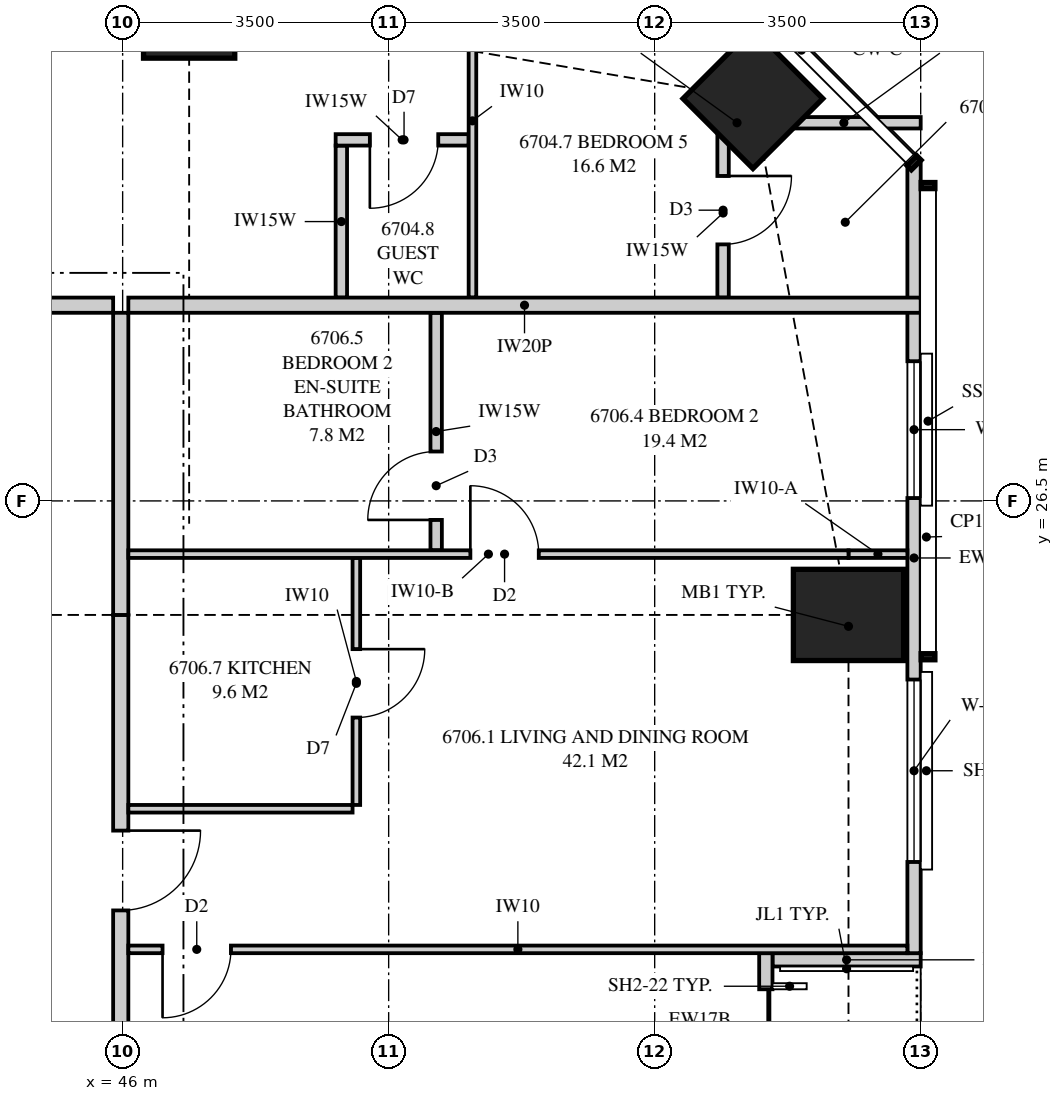
"""IFC4 building model, lengths in metres.
Left out: names, types, materials, properties, quantities, classifications, styles, units other than length and angle.
Written with IfcOpenShell. Run it as: python <this file> out.ifc"""

import sys

from ifc_helpers import new_model, si_unit, direction, frame, frame_2d, origin, origin_2d, place, context, subcontext, project, spatial, polyline, rectangle, outline, extrude, element, fill, save


model = new_model("IFC4")
c1 = context("Model", 3, precision=1e-05, world=origin(), true_north=direction((0.0, 1.0)))
c2 = subcontext(c1, "Body", "Model", "MODEL_VIEW")
j1 = project(units=[si_unit("LENGTHUNIT", "METRE"), si_unit("PLANEANGLEUNIT", "RADIAN")], contexts=[c1])
p1 = place(None, origin())
s1 = spatial("IfcSite", under=j1, at=p1, CompositionType="ELEMENT")
p2 = place(p1, origin())
s2 = spatial("IfcBuilding", under=s1, at=p2, CompositionType="ELEMENT")
p3 = place(p2, frame((0.0, 0.0, 245.95)))
s3 = spatial("IfcBuildingStorey", under=s2, at=p3, CompositionType="ELEMENT", Elevation=245.95)
p4 = place(p3, frame((55.55, 25.0, 0.0), z_axis=(0.0, 0.0, 1.0), x_axis=(1.0, 0.0, 0.0)))
e1 = element("IfcColumn", 1, at=p4, inside=s3, PredefinedType="COLUMN", context=c2, shape_type="SweptSolid", body=[
    extrude(rectangle(XDim=1.45, YDim=1.2, at=origin_2d()), origin(), (0.0, 0.0, 1.0), 3.5),
])
p5 = place(p3, frame((54.293, 31.793, 0.0), z_axis=(0.0, 0.0, 1.0), x_axis=(0.707106781187, 0.707106781187, 0.0)))
e2 = element("IfcColumn", 2, at=p5, inside=s3, PredefinedType="COLUMN", context=c2, shape_type="SweptSolid", body=[
    extrude(rectangle(XDim=1.3, YDim=1.3, at=origin_2d()), origin(), (0.0, 0.0, 1.0), 3.5),
])
p6 = place(p3, frame((46.875, 33.05, 0.0), z_axis=(0.0, 0.0, 1.0), x_axis=(0.0, 1.0, 0.0)))
e3 = element("IfcColumn", 3, at=p6, inside=s3, PredefinedType="COLUMN", context=c2, shape_type="SweptSolid", body=[
    extrude(rectangle(XDim=1.45, YDim=1.2, at=origin_2d()), origin(), (0.0, 0.0, 1.0), 3.5),
])
p7 = place(p3, frame((56.413, 20.55, 0.0), z_axis=(0.0, 0.0, 1.0), x_axis=(0.0, 1.0, 0.0)))
e4 = element("IfcWall", 4, at=p7, inside=s3, PredefinedType="SOLIDWALL", context=c2, shape_type="SweptSolid", body=[
    extrude(outline(polyline([(0.0, 0.0), (10.399, 0.0), (10.399, 3.26), (4.658, 3.26), (4.658, 2.3), (4.594, 2.3), (4.594, 3.26), (4.45, 3.26), (4.45, 2.3), (0.0, 2.3), (0.0, 0.0)])), frame((0.0, 0.087, 0.0), z_axis=(0.0, -1.0, 0.0), x_axis=(1.0, 0.0, 0.0)), (0.0, 0.0, 1.0), 0.175),
])
p8 = place(p7, frame((1.2, 0.0, 0.4)))
e5 = element("IfcOpeningElement", 5, at=p8, cuts=e4, PredefinedType="OPENING", context=c2, shape_type="SweptSolid", body=[
    extrude(rectangle(XDim=2.4, YDim=1.85, at=frame_2d((1.2, 0.925))), frame((0.0, 0.097, 0.0), z_axis=(0.0, -1.0, 0.0), x_axis=(1.0, 0.0, 0.0)), (0.0, 0.0, 1.0), 0.195),
])
p9 = place(p7, frame((5.988, 0.0, 0.4)))
e6 = element("IfcOpeningElement", 6, at=p9, cuts=e4, PredefinedType="OPENING", context=c2, shape_type="SweptSolid", body=[
    extrude(rectangle(XDim=1.8, YDim=1.85, at=frame_2d((0.9, 0.925))), frame((0.0, 0.097, 0.0), z_axis=(0.0, -1.0, 0.0), x_axis=(1.0, 0.0, 0.0)), (0.0, 0.0, 1.0), 0.195),
])
p10 = place(p3, frame((54.462, 17.8, 0.0), z_axis=(0.0, 0.0, 1.0), x_axis=(0.0, 1.0, 0.0)))
e7 = element("IfcWall", 7, at=p10, inside=s3, PredefinedType="SOLIDWALL", context=c2, shape_type="SweptSolid", body=[
    extrude(outline(polyline([(0.0, 0.0), (2.75, 0.0), (2.75, 3.26), (2.15, 3.26), (2.15, 2.66), (0.0, 2.66), (0.0, 0.0)])), frame((0.0, 0.087, 0.0), z_axis=(0.0, -1.0, 0.0), x_axis=(1.0, 0.0, 0.0)), (0.0, 0.0, 1.0), 0.175),
])
p11 = place(p10, frame((0.475, 0.0, 0.0)))
e8 = element("IfcOpeningElement", 8, at=p11, cuts=e7, PredefinedType="OPENING", context=c2, shape_type="SweptSolid", body=[
    extrude(rectangle(XDim=1.8, YDim=2.25, at=frame_2d((0.9, 1.125))), frame((0.0, 0.097, 0.0), z_axis=(0.0, -1.0, 0.0), x_axis=(1.0, 0.0, 0.0)), (0.0, 0.0, 1.0), 0.195),
])
p12 = place(p3, frame((56.5, 20.462, 0.0), z_axis=(0.0, 0.0, 1.0), x_axis=(-1.0, 0.0, 0.0)))
e9 = element("IfcWall", 9, at=p12, inside=s3, PredefinedType="SOLIDWALL", context=c2, shape_type="SweptSolid", body=[
    extrude(outline(polyline([(0.0, 0.0), (1.95, 0.0), (1.95, 3.26), (1.75, 3.26), (1.75, 2.3), (0.15, 2.3), (0.15, 3.26), (0.0, 3.26), (0.0, 0.0)])), frame((0.0, 0.087, 0.0), z_axis=(0.0, -1.0, 0.0), x_axis=(1.0, 0.0, 0.0)), (0.0, 0.0, 1.0), 0.175),
])
p13 = place(p3, frame((18.0, 29.075, 0.0), z_axis=(0.0, 0.0, 1.0), x_axis=(1.0, 0.0, 0.0)))
e10 = element("IfcWall", 10, at=p13, inside=s3, PredefinedType="PARTITIONING", context=c2, shape_type="SweptSolid", body=[
    extrude(outline(polyline([(0.0, 0.0), (27.875, 0.0), (27.875, 3.26), (27.875, 2.66), (27.565, 2.66), (27.565, 3.26), (20.56, 3.26), (20.56, 2.66), (17.94, 2.66), (17.94, 3.26), (10.935, 3.26), (10.935, 2.66), (8.315, 2.66), (8.315, 3.26), (2.192, 3.26), (2.192, 2.3), (0.256, 2.3), (0.256, 3.26), (0.0, 3.26), (0.0, 0.0)])), frame((0.0, 0.1, 0.0), z_axis=(0.0, -1.0, 0.0), x_axis=(1.0, 0.0, 0.0)), (0.0, 0.0, 1.0), 0.2),
])
p14 = place(p13, frame((18.75, 0.0, 0.0)))
e11 = element("IfcOpeningElement", 11, at=p14, cuts=e10, PredefinedType="OPENING", context=c2, shape_type="SweptSolid", body=[
    extrude(rectangle(XDim=1.05, YDim=2.2, at=frame_2d((0.525, 1.1))), frame((0.0, 0.11, 0.0), z_axis=(0.0, -1.0, 0.0), x_axis=(1.0, 0.0, 0.0)), (0.0, 0.0, 1.0), 0.22),
])
p15 = place(p3, frame((53.975, 31.475, 0.0), z_axis=(0.0, 0.0, 1.0), x_axis=(1.0, 0.0, 0.0)))
e12 = element("IfcWall", 12, at=p15, inside=s3, PredefinedType="PLUMBINGWALL", context=c2, shape_type="SweptSolid", body=[
    extrude(rectangle(XDim=0.217, YDim=0.15, at=frame_2d((0.108, 0.0))), origin(), (0.0, 0.0, 1.0), 2.3),
])
p16 = place(p3, frame((54.478, 31.475, 0.0), z_axis=(0.0, 0.0, 1.0), x_axis=(1.0, 0.0, 0.0)))
e13 = element("IfcWall", 13, at=p16, inside=s3, PredefinedType="PLUMBINGWALL", context=c2, shape_type="SweptSolid", body=[
    extrude(outline(polyline([(0.774, 3.26), (0.774, 2.3), (0.325, 2.3), (0.0, 1.15), (0.325, 0.0), (2.022, 0.0), (2.022, 3.26), (0.774, 3.26)])), frame((0.0, 0.075, 0.0), z_axis=(0.0, -1.0, 0.0), x_axis=(1.0, 0.0, 0.0)), (0.0, 0.0, 1.0), 0.15),
])
p17 = place(p3, frame((53.9, 31.4, 0.0), z_axis=(0.0, 0.0, 1.0), x_axis=(0.0, -1.0, 0.0)))
e14 = element("IfcWall", 14, at=p17, inside=s3, PredefinedType="PLUMBINGWALL", context=c2, shape_type="SweptSolid", body=[
    extrude(outline(polyline([(0.0, 0.0), (2.225, 0.0), (2.225, 3.26), (2.225, 2.3), (0.438, 2.3), (0.0, 2.3), (0.0, 3.26), (0.0, 0.0)])), frame((0.0, 0.075, 0.0), z_axis=(0.0, -1.0, 0.0), x_axis=(1.0, 0.0, 0.0)), (0.0, 0.0, 1.0), 0.15),
])
p18 = place(p17, frame((0.625, 0.0, 0.0)))
e15 = element("IfcOpeningElement", 15, at=p18, cuts=e14, PredefinedType="OPENING", context=c2, shape_type="SweptSolid", body=[
    extrude(rectangle(XDim=0.9, YDim=2.1, at=frame_2d((0.45, 1.05))), frame((0.0, 0.085, 0.0), z_axis=(0.0, -1.0, 0.0), x_axis=(1.0, 0.0, 0.0)), (0.0, 0.0, 1.0), 0.17),
])
p19 = place(p3, frame((50.603, 33.825, 0.0), z_axis=(0.0, 0.0, 1.0), x_axis=(0.0, -1.0, 0.0)))
e16 = element("IfcWall", 16, at=p19, inside=s3, PredefinedType="PARTITIONING", context=c2, shape_type="SweptSolid", body=[
    extrude(outline(polyline([(0.0, 0.0), (4.65, 0.0), (4.65, 3.26), (2.279, 3.26), (2.279, 2.3), (0.534, 2.3), (0.534, 3.26), (0.0, 3.26), (0.0, 0.0)])), frame((0.0, 0.05, 0.0), z_axis=(0.0, -1.0, 0.0), x_axis=(1.0, 0.0, 0.0)), (0.0, 0.0, 1.0), 0.1),
])
p20 = place(p19, frame((0.15, 0.0, 0.0)))
e17 = element("IfcOpeningElement", 17, at=p20, cuts=e16, PredefinedType="OPENING", context=c2, shape_type="SweptSolid", body=[
    extrude(rectangle(XDim=0.9, YDim=2.1, at=frame_2d((0.45, 1.05))), frame((0.0, 0.06, 0.0), z_axis=(0.0, -1.0, 0.0), x_axis=(1.0, 0.0, 0.0)), (0.0, 0.0, 1.0), 0.12),
])
p21 = place(p3, frame((46.075, 29.075, 0.0), z_axis=(0.0, 0.0, 1.0), x_axis=(1.0, 0.0, 0.0)))
e18 = element("IfcWall", 18, at=p21, inside=s3, PredefinedType="PARTITIONING", context=c2, shape_type="SweptSolid", body=[
    extrude(outline(polyline([(0.0, 0.0), (10.425, 0.0), (10.425, 3.26), (9.646, 3.26), (9.646, 2.3), (7.795, 2.3), (7.795, 3.26), (2.11, 3.26), (2.11, 2.66), (0.0, 2.66), (0.0, 3.26), (0.0, 0.0)])), frame((0.0, 0.1, 0.0), z_axis=(0.0, -1.0, 0.0), x_axis=(1.0, 0.0, 0.0)), (0.0, 0.0, 1.0), 0.2),
])
p22 = place(p3, frame((45.975, 14.25, 0.0), z_axis=(0.0, 0.0, 1.0), x_axis=(0.0, 1.0, 0.0)))
e19 = element("IfcWall", 19, at=p22, inside=s3, PredefinedType="PARTITIONING", context=c2, shape_type="SweptSolid", body=[
    extrude(outline(polyline([(0.0, 0.0), (10.75, 0.0), (10.75, 2.66), (9.44, 2.66), (9.44, 3.26), (5.81, 3.26), (5.81, 2.66), (3.19, 2.66), (3.19, 3.26), (0.06, 3.26), (0.06, 2.66), (0.0, 2.66), (0.0, 0.0)])), frame((0.0, 0.1, 0.0), z_axis=(0.0, -1.0, 0.0), x_axis=(1.0, 0.0, 0.0)), (0.0, 0.0, 1.0), 0.2),
])
p23 = place(p22, frame((6.863, 0.0, 0.0)))
e20 = element("IfcOpeningElement", 20, at=p23, cuts=e19, PredefinedType="OPENING", context=c2, shape_type="SweptSolid", body=[
    extrude(rectangle(XDim=1.05, YDim=2.2, at=frame_2d((0.525, 1.1))), frame((0.0, 0.11, 0.0), z_axis=(0.0, -1.0, 0.0), x_axis=(1.0, 0.0, 0.0)), (0.0, 0.0, 1.0), 0.22),
])
p24 = place(p3, frame((45.975, 25.0, 0.0), z_axis=(0.0, 0.0, 1.0), x_axis=(0.0, 1.0, 0.0)))
e21 = element("IfcWall", 21, at=p24, inside=s3, PredefinedType="PARTITIONING", context=c2, shape_type="SweptSolid", body=[
    extrude(rectangle(XDim=3.975, YDim=0.2, at=frame_2d((1.988, 0.0))), origin(), (0.0, 0.0, 1.0), 2.66),
])
p25 = place(p3, frame((56.325, 25.8, 0.0), z_axis=(0.0, 0.0, 1.0), x_axis=(-1.0, 0.0, 0.0)))
e22 = element("IfcWall", 22, at=p25, inside=s3, PredefinedType="PARTITIONING", context=c2, shape_type="SweptSolid", body=[
    extrude(outline(polyline([(0.0, 0.0), (0.775, 0.0), (0.775, 2.3), (0.048, 2.3), (0.048, 3.26), (0.0, 3.26), (0.0, 0.0)])), frame((0.0, 0.05, 0.0), z_axis=(0.0, -1.0, 0.0), x_axis=(1.0, 0.0, 0.0)), (0.0, 0.0, 1.0), 0.1),
])
p26 = place(p3, frame((55.55, 25.8, 0.0), z_axis=(0.0, 0.0, 1.0), x_axis=(-1.0, 0.0, 0.0)))
e23 = element("IfcWall", 23, at=p26, inside=s3, PredefinedType="PARTITIONING", context=c2, shape_type="SweptSolid", body=[
    extrude(outline(polyline([(0.0, 0.0), (9.475, 0.0), (9.475, 2.66), (1.023, 2.66), (1.023, 2.3), (0.0, 2.3), (0.0, 0.0)])), frame((0.0, 0.05, 0.0), z_axis=(0.0, -1.0, 0.0), x_axis=(1.0, 0.0, 0.0)), (0.0, 0.0, 1.0), 0.1),
])
p27 = place(p26, frame((4.075, 0.0, 0.0)))
e24 = element("IfcOpeningElement", 24, at=p27, cuts=e23, PredefinedType="OPENING", context=c2, shape_type="SweptSolid", body=[
    extrude(rectangle(XDim=0.9, YDim=2.1, at=frame_2d((0.45, 1.05))), frame((0.0, 0.06, 0.0), z_axis=(0.0, -1.0, 0.0), x_axis=(1.0, 0.0, 0.0)), (0.0, 0.0, 1.0), 0.12),
])
p28 = place(p3, frame((50.125, 25.85, 0.0), z_axis=(0.0, 0.0, 1.0), x_axis=(0.0, 1.0, 0.0)))
e25 = element("IfcWall", 25, at=p28, inside=s3, PredefinedType="PLUMBINGWALL", context=c2, shape_type="SweptSolid", body=[
    extrude(outline(polyline([(0.0, 0.0), (3.125, 0.0), (3.125, 3.26), (0.435, 3.26), (0.435, 2.66), (0.0, 2.66), (0.0, 3.26), (0.0, 0.0)])), frame((0.0, 0.075, 0.0), z_axis=(0.0, -1.0, 0.0), x_axis=(1.0, 0.0, 0.0)), (0.0, 0.0, 1.0), 0.15),
])
p29 = place(p28, frame((0.4, 0.0, 0.0)))
e26 = element("IfcOpeningElement", 26, at=p29, cuts=e25, PredefinedType="OPENING", context=c2, shape_type="SweptSolid", body=[
    extrude(rectangle(XDim=0.9, YDim=2.1, at=frame_2d((0.45, 1.05))), frame((0.0, 0.085, 0.0), z_axis=(0.0, -1.0, 0.0), x_axis=(1.0, 0.0, 0.0)), (0.0, 0.0, 1.0), 0.17),
])
p30 = place(p3, frame((56.325, 20.6, 0.0), z_axis=(0.0, 0.0, 1.0), x_axis=(-1.0, 0.0, 0.0)))
e27 = element("IfcWall", 27, at=p30, inside=s3, PredefinedType="PARTITIONING", context=c2, shape_type="SweptSolid", body=[
    extrude(outline(polyline([(0.0, 0.0), (10.25, 0.0), (10.25, 3.26), (1.635, 3.26), (1.635, 2.3), (0.0, 2.3), (0.0, 3.26), (0.0, 0.0)])), frame((0.0, 0.05, 0.0), z_axis=(0.0, -1.0, 0.0), x_axis=(1.0, 0.0, 0.0)), (0.0, 0.0, 1.0), 0.1),
])
p31 = place(p30, frame((8.9, 0.0, 0.0)))
e28 = element("IfcOpeningElement", 28, at=p31, cuts=e27, PredefinedType="OPENING", context=c2, shape_type="SweptSolid", body=[
    extrude(rectangle(XDim=0.9, YDim=2.1, at=frame_2d((0.45, 1.05))), frame((0.0, 0.06, 0.0), z_axis=(0.0, -1.0, 0.0), x_axis=(1.0, 0.0, 0.0)), (0.0, 0.0, 1.0), 0.12),
])
p32 = place(p3, frame((49.075, 22.5, 0.0), z_axis=(0.0, 0.0, 1.0), x_axis=(0.0, 1.0, 0.0)))
e29 = element("IfcWall", 29, at=p32, inside=s3, PredefinedType="PARTITIONING", context=c2, shape_type="SweptSolid", body=[
    extrude(outline(polyline([(0.0, 0.0), (3.25, 0.0), (3.25, 3.26), (3.25, 2.66), (1.24, 2.66), (1.24, 3.26), (0.0, 3.26), (0.0, 0.0)])), frame((0.0, 0.05, 0.0), z_axis=(0.0, -1.0, 0.0), x_axis=(1.0, 0.0, 0.0)), (0.0, 0.0, 1.0), 0.1),
])
p33 = place(p32, frame((1.15, 0.0, 0.0)))
e30 = element("IfcOpeningElement", 30, at=p33, cuts=e29, PredefinedType="OPENING", context=c2, shape_type="SweptSolid", body=[
    extrude(rectangle(XDim=0.9, YDim=2.1, at=frame_2d((0.45, 1.05))), frame((0.0, 0.06, 0.0), z_axis=(0.0, -1.0, 0.0), x_axis=(1.0, 0.0, 0.0)), (0.0, 0.0, 1.0), 0.12),
])
p34 = place(p3, frame((49.025, 22.45, 0.0), z_axis=(0.0, 0.0, 1.0), x_axis=(-1.0, 0.0, 0.0)))
e31 = element("IfcWall", 31, at=p34, inside=s3, PredefinedType="PARTITIONING", context=c2, shape_type="SweptSolid", body=[
    extrude(rectangle(XDim=2.95, YDim=0.1, at=frame_2d((1.475, 0.0))), origin(), (0.0, 0.0, 1.0), 3.26),
])
p35 = place(p3, frame((50.552, 31.25, 0.0), z_axis=(0.0, 0.0, 1.0), x_axis=(-1.0, 0.0, 0.0)))
e32 = element("IfcWall", 32, at=p35, inside=s3, PredefinedType="PLUMBINGWALL", context=c2, shape_type="SweptSolid", body=[
    extrude(rectangle(XDim=1.75, YDim=0.15, at=frame_2d((0.875, 0.0))), origin(), (0.0, 0.0, 1.0), 3.26),
])
p36 = place(p35, frame((0.4, 0.0, 0.0)))
e33 = element("IfcOpeningElement", 33, at=p36, cuts=e32, PredefinedType="OPENING", context=c2, shape_type="SweptSolid", body=[
    extrude(rectangle(XDim=0.9, YDim=2.1, at=frame_2d((0.45, 1.05))), frame((0.0, 0.085, 0.0), z_axis=(0.0, -1.0, 0.0), x_axis=(1.0, 0.0, 0.0)), (0.0, 0.0, 1.0), 0.17),
])
p37 = place(p3, frame((48.877, 29.175, 0.0), z_axis=(0.0, 0.0, 1.0), x_axis=(0.0, 1.0, 0.0)))
e34 = element("IfcWall", 34, at=p37, inside=s3, PredefinedType="PLUMBINGWALL", context=c2, shape_type="SweptSolid", body=[
    extrude(rectangle(XDim=2.0, YDim=0.15, at=frame_2d((1.0, 0.0))), origin(), (0.0, 0.0, 1.0), 3.26),
])
p38 = place(p11, origin())
e35 = element("IfcDoor", 35, at=p38, inside=s3, OperationType="SLIDING_TO_LEFT", PredefinedType="DOOR", context=c2, shape_type="SweptSolid", body=[
    extrude(rectangle(XDim=1.8, YDim=2.25, at=frame_2d((0.9, 1.125))), frame((0.0, 0.025, 0.0), z_axis=(0.0, -1.0, 0.0), x_axis=(1.0, 0.0, 0.0)), (0.0, 0.0, 1.0), 0.05),
])
fill(e8, e35)
p39 = place(p8, origin())
e36 = element("IfcWindow", 36, at=p39, inside=s3, PartitioningType="SINGLE_PANEL", PredefinedType="WINDOW", context=c2, shape_type="SweptSolid", body=[
    extrude(rectangle(XDim=2.4, YDim=1.85, at=frame_2d((1.2, 0.925))), frame((0.0, 0.03, 0.0), z_axis=(0.0, -1.0, 0.0), x_axis=(1.0, 0.0, 0.0)), (0.0, 0.0, 1.0), 0.06),
])
fill(e5, e36)
p40 = place(p9, origin())
e37 = element("IfcWindow", 37, at=p40, inside=s3, PartitioningType="SINGLE_PANEL", PredefinedType="WINDOW", context=c2, shape_type="SweptSolid", body=[
    extrude(rectangle(XDim=1.8, YDim=1.85, at=frame_2d((0.9, 0.925))), frame((0.0, 0.03, 0.0), z_axis=(0.0, -1.0, 0.0), x_axis=(1.0, 0.0, 0.0)), (0.0, 0.0, 1.0), 0.06),
])
fill(e6, e37)
p41 = place(p18, origin())
e38 = element("IfcDoor", 38, at=p41, inside=s3, OperationType="SINGLE_SWING_LEFT", PredefinedType="DOOR", context=c2, shape_type="SweptSolid", body=[
    extrude(rectangle(XDim=0.9, YDim=2.1, at=frame_2d((0.45, 1.05))), frame((0.0, 0.025, 0.0), z_axis=(0.0, -1.0, 0.0), x_axis=(1.0, 0.0, 0.0)), (0.0, 0.0, 1.0), 0.05),
])
fill(e15, e38)
p42 = place(p23, frame((1.05, 0.0, 0.0), z_axis=(0.0, 0.0, 1.0), x_axis=(-1.0, 0.0, 0.0)))
e39 = element("IfcDoor", 39, at=p42, inside=s3, OperationType="SINGLE_SWING_LEFT", PredefinedType="DOOR", context=c2, shape_type="SweptSolid", body=[
    extrude(rectangle(XDim=1.05, YDim=2.2, at=frame_2d((0.525, 1.1))), frame((0.0, 0.025, 0.0), z_axis=(0.0, -1.0, 0.0), x_axis=(1.0, 0.0, 0.0)), (0.0, 0.0, 1.0), 0.05),
])
fill(e20, e39)
p43 = place(p27, frame((0.9, 0.0, 0.0), z_axis=(0.0, 0.0, 1.0), x_axis=(-1.0, 0.0, 0.0)))
e40 = element("IfcDoor", 40, at=p43, inside=s3, OperationType="SINGLE_SWING_LEFT", PredefinedType="DOOR", context=c2, shape_type="SweptSolid", body=[
    extrude(rectangle(XDim=0.9, YDim=2.1, at=frame_2d((0.45, 1.05))), frame((0.0, 0.025, 0.0), z_axis=(0.0, -1.0, 0.0), x_axis=(1.0, 0.0, 0.0)), (0.0, 0.0, 1.0), 0.05),
])
fill(e24, e40)
p44 = place(p29, origin())
e41 = element("IfcDoor", 41, at=p44, inside=s3, OperationType="SINGLE_SWING_LEFT", PredefinedType="DOOR", context=c2, shape_type="SweptSolid", body=[
    extrude(rectangle(XDim=0.9, YDim=2.1, at=frame_2d((0.45, 1.05))), frame((0.0, 0.025, 0.0), z_axis=(0.0, -1.0, 0.0), x_axis=(1.0, 0.0, 0.0)), (0.0, 0.0, 1.0), 0.05),
])
fill(e26, e41)
p45 = place(p31, origin())
e42 = element("IfcDoor", 42, at=p45, inside=s3, OperationType="SINGLE_SWING_RIGHT", PredefinedType="DOOR", context=c2, shape_type="SweptSolid", body=[
    extrude(rectangle(XDim=0.9, YDim=2.1, at=frame_2d((0.45, 1.05))), frame((0.0, 0.025, 0.0), z_axis=(0.0, -1.0, 0.0), x_axis=(1.0, 0.0, 0.0)), (0.0, 0.0, 1.0), 0.05),
])
fill(e28, e42)
p46 = place(p33, frame((0.9, 0.0, 0.0), z_axis=(0.0, 0.0, 1.0), x_axis=(-1.0, 0.0, 0.0)))
e43 = element("IfcDoor", 43, at=p46, inside=s3, OperationType="SINGLE_SWING_LEFT", PredefinedType="DOOR", context=c2, shape_type="SweptSolid", body=[
    extrude(rectangle(XDim=0.9, YDim=2.1, at=frame_2d((0.45, 1.05))), frame((0.0, 0.025, 0.0), z_axis=(0.0, -1.0, 0.0), x_axis=(1.0, 0.0, 0.0)), (0.0, 0.0, 1.0), 0.05),
])
fill(e30, e43)
p47 = place(p36, origin())
e44 = element("IfcDoor", 44, at=p47, inside=s3, OperationType="SINGLE_SWING_RIGHT", PredefinedType="DOOR", context=c2, shape_type="SweptSolid", body=[
    extrude(rectangle(XDim=0.9, YDim=2.1, at=frame_2d((0.45, 1.05))), frame((0.0, 0.025, 0.0), z_axis=(0.0, -1.0, 0.0), x_axis=(1.0, 0.0, 0.0)), (0.0, 0.0, 1.0), 0.05),
])
fill(e33, e44)
save(model, sys.argv[1])
